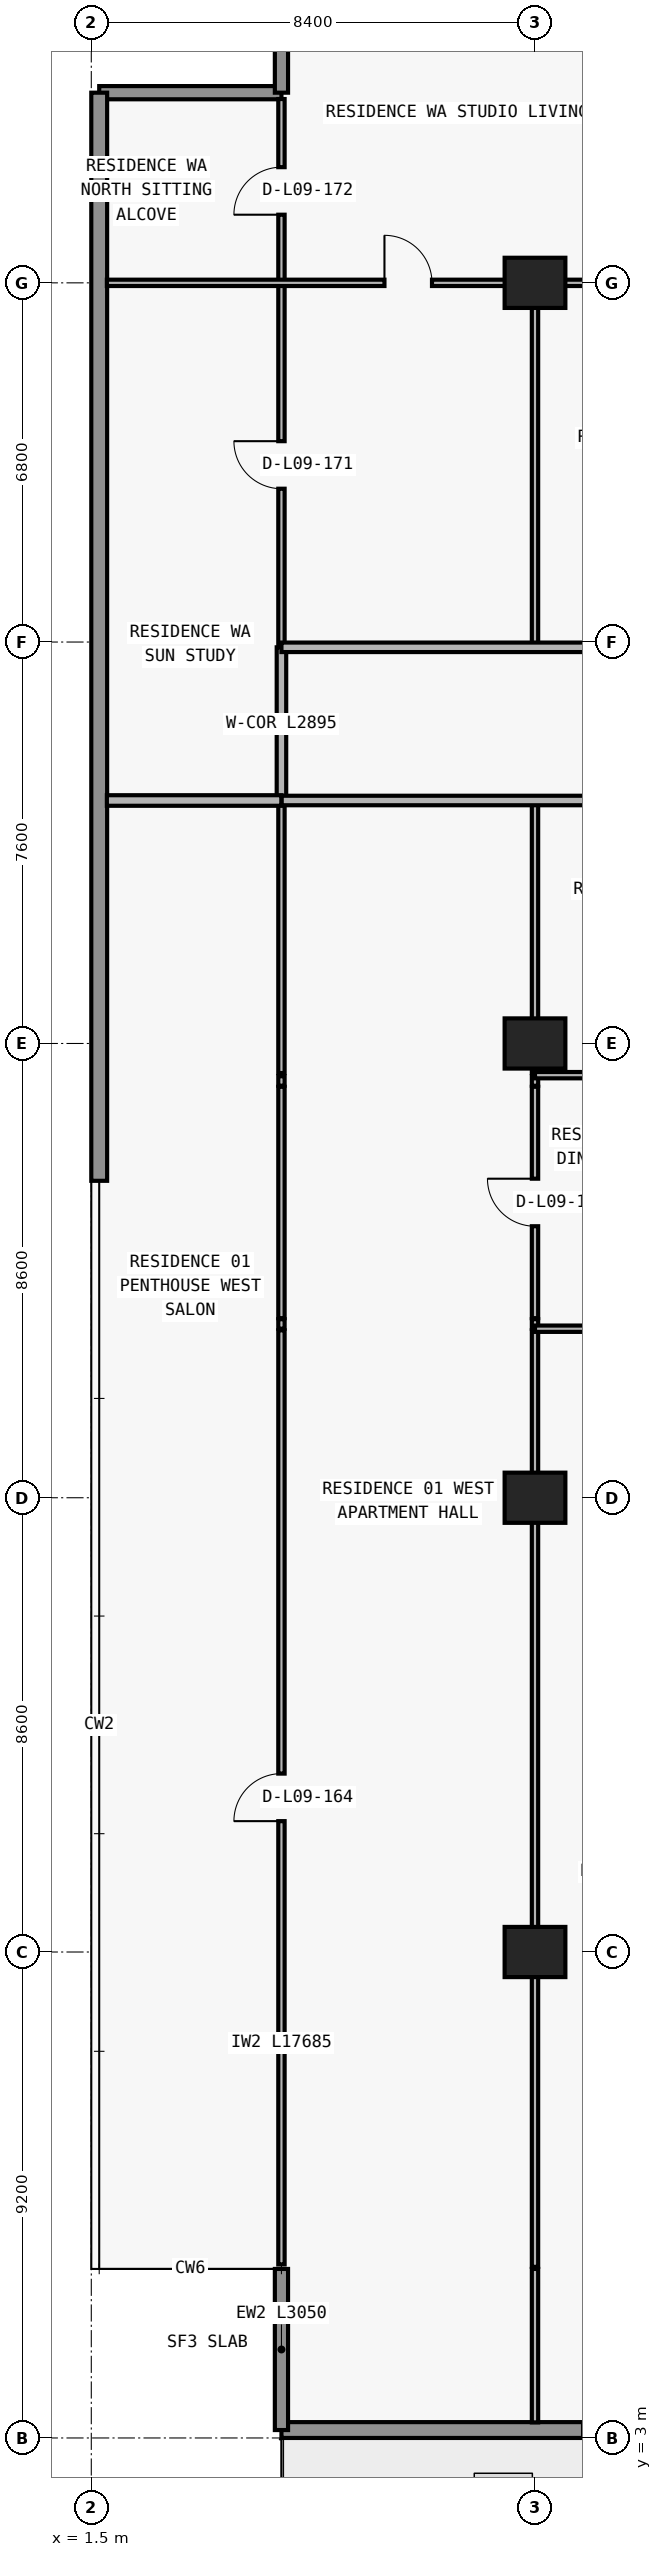
"""IFC4 building model, lengths in metres.
Left out: names, types, materials, properties, quantities, classifications, styles, units other than length and angle.
Written with IfcOpenShell. Run it as: python <this file> out.ifc"""

import sys

from ifc_helpers import new_model, si_unit, direction, frame, frame_2d, origin, origin_2d, place, context, subcontext, project, spatial, rectangle, extrude, element, fill, save


model = new_model("IFC4")
c1 = context("Model", 3, precision=1e-05, world=origin(), true_north=direction((0.0, 1.0)))
c2 = subcontext(c1, "Body", "Model", "MODEL_VIEW")
j1 = project(units=[si_unit("LENGTHUNIT", "METRE"), si_unit("PLANEANGLEUNIT", "RADIAN")], contexts=[c1])
p1 = place(None, origin())
s1 = spatial("IfcSite", under=j1, at=p1, CompositionType="ELEMENT")
p2 = place(p1, origin())
s2 = spatial("IfcBuilding", under=s1, at=p2, CompositionType="ELEMENT")
p3 = place(p2, frame((0.0, 0.0, 39.9)))
s3 = spatial("IfcBuildingStorey", under=s2, at=p3, CompositionType="ELEMENT", Elevation=39.9)
for number, where, z_axis, x_axis in (
    (1, (9.9, 12.2, 0.0), (0.0, 0.0, 1.0), (1.0, 0.0, 0.0)),
    (2, (9.9, 20.8, 0.0), (0.0, 0.0, 1.0), (1.0, 0.0, 0.0)),
    (3, (9.9, 29.4, 0.0), (0.0, 0.0, 1.0), (1.0, 0.0, 0.0)),
    (4, (9.9, 43.8, 0.0), (0.0, 0.0, 1.0), (1.0, 0.0, 0.0)),
):
    element("IfcColumn", number, at=place(p3, frame(where, z_axis=z_axis, x_axis=x_axis)), inside=s3, PredefinedType="COLUMN", context=c2, shape_type="SweptSolid", body=[
        extrude(rectangle(XDim=1.15, YDim=0.95, at=origin_2d()), origin(), (0.0, 0.0, 1.0), 3.05),
    ])
p4 = place(p3, frame((72.7, 3.15, 0.0), z_axis=(0.0, 0.0, 1.0), x_axis=(-1.0, 0.0, 0.0)))
e5 = element("IfcWall", 5, at=p4, inside=s3, PredefinedType="STANDARD", context=c2, shape_type="SweptSolid", body=[
    extrude(rectangle(XDim=67.6, YDim=0.3, at=frame_2d((33.8, 0.0))), origin(), (0.0, 0.0, 1.0), 3.05),
])
p5 = place(p4, frame((59.89, 0.0, 0.0)))
e6 = element("IfcOpeningElement", 6, at=p5, cuts=e5, PredefinedType="OPENING", context=c2, shape_type="SweptSolid", body=[
    extrude(rectangle(XDim=2.0, YDim=2.3, at=frame_2d((1.0, 1.15))), frame((0.0, 0.16, 0.0), z_axis=(0.0, -1.0, 0.0), x_axis=(1.0, 0.0, 0.0)), (0.0, 0.0, 1.0), 0.32),
])
p6 = place(p4, frame((55.21, 0.0, 0.65)))
e7 = element("IfcOpeningElement", 7, at=p6, cuts=e5, PredefinedType="OPENING", context=c2, shape_type="SweptSolid", body=[
    extrude(rectangle(XDim=2.6, YDim=1.85, at=frame_2d((1.3, 0.925))), frame((0.0, 0.16, 0.0), z_axis=(0.0, -1.0, 0.0), x_axis=(1.0, 0.0, 0.0)), (0.0, 0.0, 1.0), 0.32),
])
p7 = place(p4, frame((49.1, 0.0, 0.85)))
e8 = element("IfcOpeningElement", 8, at=p7, cuts=e5, PredefinedType="OPENING", context=c2, shape_type="SweptSolid", body=[
    extrude(rectangle(XDim=2.2, YDim=1.55, at=frame_2d((1.1, 0.775))), frame((0.0, 0.16, 0.0), z_axis=(0.0, -1.0, 0.0), x_axis=(1.0, 0.0, 0.0)), (0.0, 0.0, 1.0), 0.32),
])
p8 = place(p4, frame((42.69, 0.0, 0.0)))
e9 = element("IfcOpeningElement", 9, at=p8, cuts=e5, PredefinedType="OPENING", context=c2, shape_type="SweptSolid", body=[
    extrude(rectangle(XDim=2.0, YDim=2.3, at=frame_2d((1.0, 1.15))), frame((0.0, 0.16, 0.0), z_axis=(0.0, -1.0, 0.0), x_axis=(1.0, 0.0, 0.0)), (0.0, 0.0, 1.0), 0.32),
])
p9 = place(p4, frame((38.59, 0.0, 0.85)))
e10 = element("IfcOpeningElement", 10, at=p9, cuts=e5, PredefinedType="OPENING", context=c2, shape_type="SweptSolid", body=[
    extrude(rectangle(XDim=1.8, YDim=1.55, at=frame_2d((0.9, 0.775))), frame((0.0, 0.16, 0.0), z_axis=(0.0, -1.0, 0.0), x_axis=(1.0, 0.0, 0.0)), (0.0, 0.0, 1.0), 0.32),
])
p10 = place(p4, frame((30.914, 0.0, 0.85)))
e11 = element("IfcOpeningElement", 11, at=p10, cuts=e5, PredefinedType="OPENING", context=c2, shape_type="SweptSolid", body=[
    extrude(rectangle(XDim=2.2, YDim=1.55, at=frame_2d((1.1, 0.775))), frame((0.0, 0.16, 0.0), z_axis=(0.0, -1.0, 0.0), x_axis=(1.0, 0.0, 0.0)), (0.0, 0.0, 1.0), 0.32),
])
p11 = place(p4, frame((26.69, 0.0, 0.0)))
e12 = element("IfcOpeningElement", 12, at=p11, cuts=e5, PredefinedType="OPENING", context=c2, shape_type="SweptSolid", body=[
    extrude(rectangle(XDim=2.0, YDim=2.3, at=frame_2d((1.0, 1.15))), frame((0.0, 0.16, 0.0), z_axis=(0.0, -1.0, 0.0), x_axis=(1.0, 0.0, 0.0)), (0.0, 0.0, 1.0), 0.32),
])
p12 = place(p4, frame((22.59, 0.0, 0.85)))
e13 = element("IfcOpeningElement", 13, at=p12, cuts=e5, PredefinedType="OPENING", context=c2, shape_type="SweptSolid", body=[
    extrude(rectangle(XDim=1.8, YDim=1.55, at=frame_2d((0.9, 0.775))), frame((0.0, 0.16, 0.0), z_axis=(0.0, -1.0, 0.0), x_axis=(1.0, 0.0, 0.0)), (0.0, 0.0, 1.0), 0.32),
])
p13 = place(p4, frame((18.69, 0.0, 0.0)))
e14 = element("IfcOpeningElement", 14, at=p13, cuts=e5, PredefinedType="OPENING", context=c2, shape_type="SweptSolid", body=[
    extrude(rectangle(XDim=2.0, YDim=2.3, at=frame_2d((1.0, 1.15))), frame((0.0, 0.16, 0.0), z_axis=(0.0, -1.0, 0.0), x_axis=(1.0, 0.0, 0.0)), (0.0, 0.0, 1.0), 0.32),
])
p14 = place(p4, frame((14.01, 0.0, 0.65)))
e15 = element("IfcOpeningElement", 15, at=p14, cuts=e5, PredefinedType="OPENING", context=c2, shape_type="SweptSolid", body=[
    extrude(rectangle(XDim=2.6, YDim=1.85, at=frame_2d((1.3, 0.925))), frame((0.0, 0.16, 0.0), z_axis=(0.0, -1.0, 0.0), x_axis=(1.0, 0.0, 0.0)), (0.0, 0.0, 1.0), 0.32),
])
p15 = place(p4, frame((7.9, 0.0, 0.85)))
e16 = element("IfcOpeningElement", 16, at=p15, cuts=e5, PredefinedType="OPENING", context=c2, shape_type="SweptSolid", body=[
    extrude(rectangle(XDim=2.2, YDim=1.55, at=frame_2d((1.1, 0.775))), frame((0.0, 0.16, 0.0), z_axis=(0.0, -1.0, 0.0), x_axis=(1.0, 0.0, 0.0)), (0.0, 0.0, 1.0), 0.32),
])
p16 = place(p3, frame((5.1, 6.2, 0.0), z_axis=(0.0, 0.0, 1.0), x_axis=(0.0, -1.0, 0.0)))
e17 = element("IfcWall", 17, at=p16, inside=s3, PredefinedType="ELEMENTEDWALL", context=c2, shape_type="SweptSolid", body=[
    extrude(rectangle(XDim=3.05, YDim=0.25, at=frame_2d((1.525, 0.0))), origin(), (0.0, 0.0, 1.0), 3.05),
])
p17 = place(p3, frame((1.65, 47.4, 0.0), z_axis=(0.0, 0.0, 1.0), x_axis=(1.0, 0.0, 0.0)))
e18 = element("IfcWall", 18, at=p17, inside=s3, PredefinedType="ELEMENTEDWALL", context=c2, shape_type="SweptSolid", body=[
    extrude(rectangle(XDim=3.45, YDim=0.25, at=frame_2d((1.725, 0.0))), origin(), (0.0, 0.0, 1.0), 3.05),
])
p18 = place(p3, frame((5.1, 47.4, 0.0), z_axis=(0.0, 0.0, 1.0), x_axis=(0.0, 1.0, 0.0)))
e19 = element("IfcWall", 19, at=p18, inside=s3, PredefinedType="ELEMENTEDWALL", context=c2, shape_type="SweptSolid", body=[
    extrude(rectangle(XDim=3.05, YDim=0.25, at=frame_2d((1.525, 0.0))), origin(), (0.0, 0.0, 1.0), 3.05),
])
p19 = place(p3, frame((1.65, 26.8, 0.0), z_axis=(0.0, 0.0, 1.0), x_axis=(0.0, 1.0, 0.0)))
e20 = element("IfcWall", 20, at=p19, inside=s3, PredefinedType="STANDARD", context=c2, shape_type="SweptSolid", body=[
    extrude(rectangle(XDim=20.6, YDim=0.3, at=frame_2d((10.3, 0.0))), origin(), (0.0, 0.0, 1.0), 3.05),
])
p20 = place(p3, frame((5.1, 6.285, 0.0), z_axis=(0.0, 0.0, 1.0), x_axis=(0.0, 1.0, 0.0)))
e21 = element("IfcWall", 21, at=p20, inside=s3, PredefinedType="PARTITIONING", context=c2, shape_type="SweptSolid", body=[
    extrude(rectangle(XDim=17.685, YDim=0.12, at=frame_2d((8.843, 0.0))), origin(), (0.0, 0.0, 1.0), 3.05),
])
p21 = place(p20, frame((8.393, 0.0, 0.0)))
e22 = element("IfcOpeningElement", 22, at=p21, cuts=e21, PredefinedType="OPENING", context=c2, shape_type="SweptSolid", body=[
    extrude(rectangle(XDim=0.9, YDim=2.15, at=frame_2d((0.45, 1.075))), frame((0.0, 0.07, 0.0), z_axis=(0.0, -1.0, 0.0), x_axis=(1.0, 0.0, 0.0)), (0.0, 0.0, 1.0), 0.14),
])
p22 = place(p3, frame((5.1, 24.0, 0.0), z_axis=(0.0, 0.0, 1.0), x_axis=(0.0, 1.0, 0.0)))
e23 = element("IfcWall", 23, at=p22, inside=s3, PredefinedType="PARTITIONING", context=c2, shape_type="SweptSolid", body=[
    extrude(rectangle(XDim=0.18, YDim=0.12, at=frame_2d((0.09, 0.0))), origin(), (0.0, 0.0, 1.0), 3.05),
])
p23 = place(p3, frame((5.1, 24.2, 0.0), z_axis=(0.0, 0.0, 1.0), x_axis=(0.0, 1.0, 0.0)))
e24 = element("IfcWall", 24, at=p23, inside=s3, PredefinedType="PARTITIONING", context=c2, shape_type="SweptSolid", body=[
    extrude(rectangle(XDim=4.38, YDim=0.12, at=frame_2d((2.19, 0.0))), origin(), (0.0, 0.0, 1.0), 3.05),
])
p24 = place(p3, frame((5.1, 28.6, 0.0), z_axis=(0.0, 0.0, 1.0), x_axis=(0.0, 1.0, 0.0)))
e25 = element("IfcWall", 25, at=p24, inside=s3, PredefinedType="PARTITIONING", context=c2, shape_type="SweptSolid", body=[
    extrude(rectangle(XDim=0.18, YDim=0.12, at=frame_2d((0.09, 0.0))), origin(), (0.0, 0.0, 1.0), 3.05),
])
p25 = place(p3, frame((5.1, 28.84, 0.0), z_axis=(0.0, 0.0, 1.0), x_axis=(0.0, 1.0, 0.0)))
e26 = element("IfcWall", 26, at=p25, inside=s3, PredefinedType="PARTITIONING", context=c2, shape_type="SweptSolid", body=[
    extrude(rectangle(XDim=5.16, YDim=0.12, at=frame_2d((2.58, 0.0))), origin(), (0.0, 0.0, 1.0), 3.05),
])
p26 = place(p3, frame((5.1, 34.005, 0.0), z_axis=(0.0, 0.0, 1.0), x_axis=(0.0, 1.0, 0.0)))
e27 = element("IfcWall", 27, at=p26, inside=s3, PredefinedType="PARTITIONING", context=c2, shape_type="SweptSolid", body=[
    extrude(rectangle(XDim=2.895, YDim=0.18, at=frame_2d((1.448, 0.0))), origin(), (0.0, 0.0, 1.0), 3.05),
])
p27 = place(p3, frame((5.1, 36.905, 0.0), z_axis=(0.0, 0.0, 1.0), x_axis=(0.0, 1.0, 0.0)))
e28 = element("IfcWall", 28, at=p27, inside=s3, PredefinedType="PARTITIONING", context=c2, shape_type="SweptSolid", body=[
    extrude(rectangle(XDim=10.375, YDim=0.12, at=frame_2d((5.188, 0.0))), origin(), (0.0, 0.0, 1.0), 3.05),
])
p28 = place(p27, frame((2.998, 0.0, 0.0)))
e29 = element("IfcOpeningElement", 29, at=p28, cuts=e28, PredefinedType="OPENING", context=c2, shape_type="SweptSolid", body=[
    extrude(rectangle(XDim=0.9, YDim=2.15, at=frame_2d((0.45, 1.075))), frame((0.0, 0.07, 0.0), z_axis=(0.0, -1.0, 0.0), x_axis=(1.0, 0.0, 0.0)), (0.0, 0.0, 1.0), 0.14),
])
p29 = place(p27, frame((8.185, 0.0, 0.0)))
e30 = element("IfcOpeningElement", 30, at=p29, cuts=e28, PredefinedType="OPENING", context=c2, shape_type="SweptSolid", body=[
    extrude(rectangle(XDim=0.9, YDim=2.15, at=frame_2d((0.45, 1.075))), frame((0.0, 0.07, 0.0), z_axis=(0.0, -1.0, 0.0), x_axis=(1.0, 0.0, 0.0)), (0.0, 0.0, 1.0), 0.14),
])
p30 = place(p3, frame((9.9, 3.295, 0.0), z_axis=(0.0, 0.0, 1.0), x_axis=(0.0, 1.0, 0.0)))
e31 = element("IfcWall", 31, at=p30, inside=s3, PredefinedType="PARTITIONING", context=c2, shape_type="SweptSolid", body=[
    extrude(rectangle(XDim=2.905, YDim=0.12, at=frame_2d((1.453, 0.0))), origin(), (0.0, 0.0, 1.0), 3.05),
])
p31 = place(p3, frame((9.9, 6.24, 0.0), z_axis=(0.0, 0.0, 1.0), x_axis=(0.0, 1.0, 0.0)))
e32 = element("IfcWall", 32, at=p31, inside=s3, PredefinedType="PARTITIONING", context=c2, shape_type="SweptSolid", body=[
    extrude(rectangle(XDim=17.73, YDim=0.12, at=frame_2d((8.865, 0.0))), origin(), (0.0, 0.0, 1.0), 2.11),
])
p32 = place(p3, frame((9.9, 24.0, 0.0), z_axis=(0.0, 0.0, 1.0), x_axis=(0.0, 1.0, 0.0)))
e33 = element("IfcWall", 33, at=p32, inside=s3, PredefinedType="PARTITIONING", context=c2, shape_type="SweptSolid", body=[
    extrude(rectangle(XDim=0.18, YDim=0.12, at=frame_2d((0.09, 0.0))), origin(), (0.0, 0.0, 1.0), 2.11),
])
p33 = place(p3, frame((9.9, 24.2, 0.0), z_axis=(0.0, 0.0, 1.0), x_axis=(0.0, 1.0, 0.0)))
e34 = element("IfcWall", 34, at=p33, inside=s3, PredefinedType="PARTITIONING", context=c2, shape_type="SweptSolid", body=[
    extrude(rectangle(XDim=4.38, YDim=0.12, at=frame_2d((2.19, 0.0))), origin(), (0.0, 0.0, 1.0), 2.11),
])
p34 = place(p33, frame((1.74, 0.0, 0.0)))
e35 = element("IfcOpeningElement", 35, at=p34, cuts=e34, PredefinedType="OPENING", context=c2, shape_type="SweptSolid", body=[
    extrude(rectangle(XDim=0.9, YDim=2.06, at=frame_2d((0.45, 1.03))), frame((0.0, 0.07, 0.0), z_axis=(0.0, -1.0, 0.0), x_axis=(1.0, 0.0, 0.0)), (0.0, 0.0, 1.0), 0.14),
])
p35 = place(p3, frame((9.9, 28.6, 0.0), z_axis=(0.0, 0.0, 1.0), x_axis=(0.0, 1.0, 0.0)))
e36 = element("IfcWall", 36, at=p35, inside=s3, PredefinedType="PARTITIONING", context=c2, shape_type="SweptSolid", body=[
    extrude(rectangle(XDim=0.18, YDim=0.12, at=frame_2d((0.09, 0.0))), origin(), (0.0, 0.0, 1.0), 2.11),
])
p36 = place(p3, frame((9.9, 28.84, 0.0), z_axis=(0.0, 0.0, 1.0), x_axis=(0.0, 1.0, 0.0)))
e37 = element("IfcWall", 37, at=p36, inside=s3, PredefinedType="PARTITIONING", context=c2, shape_type="SweptSolid", body=[
    extrude(rectangle(XDim=5.16, YDim=0.12, at=frame_2d((2.58, 0.0))), origin(), (0.0, 0.0, 1.0), 2.11),
])
p37 = place(p3, frame((9.9, 36.9, 0.0), z_axis=(0.0, 0.0, 1.0), x_axis=(0.0, 1.0, 0.0)))
e38 = element("IfcWall", 38, at=p37, inside=s3, PredefinedType="PARTITIONING", context=c2, shape_type="SweptSolid", body=[
    extrude(rectangle(XDim=6.9, YDim=0.12, at=frame_2d((3.45, 0.0))), origin(), (0.0, 0.0, 1.0), 2.11),
])
p38 = place(p3, frame((9.9, 24.0, 0.0), z_axis=(0.0, 0.0, 1.0), x_axis=(1.0, 0.0, 0.0)))
e39 = element("IfcWall", 39, at=p38, inside=s3, PredefinedType="PARTITIONING", context=c2, shape_type="SweptSolid", body=[
    extrude(rectangle(XDim=8.4, YDim=0.12, at=frame_2d((4.2, 0.0))), origin(), (0.0, 0.0, 1.0), 3.05),
])
p39 = place(p38, frame((1.44, 0.0, 0.0)))
e40 = element("IfcOpeningElement", 40, at=p39, cuts=e39, PredefinedType="OPENING", context=c2, shape_type="SweptSolid", body=[
    extrude(rectangle(XDim=0.9, YDim=2.15, at=frame_2d((0.45, 1.075))), frame((0.0, 0.07, 0.0), z_axis=(0.0, -1.0, 0.0), x_axis=(1.0, 0.0, 0.0)), (0.0, 0.0, 1.0), 0.14),
])
p40 = place(p3, frame((9.9, 28.8, 0.0), z_axis=(0.0, 0.0, 1.0), x_axis=(1.0, 0.0, 0.0)))
e41 = element("IfcWall", 41, at=p40, inside=s3, PredefinedType="PARTITIONING", context=c2, shape_type="SweptSolid", body=[
    extrude(rectangle(XDim=8.395, YDim=0.12, at=frame_2d((4.198, 0.0))), origin(), (0.0, 0.0, 1.0), 3.05),
])
p41 = place(p40, frame((1.44, 0.0, 0.0)))
e42 = element("IfcOpeningElement", 42, at=p41, cuts=e41, PredefinedType="OPENING", context=c2, shape_type="SweptSolid", body=[
    extrude(rectangle(XDim=0.9, YDim=2.15, at=frame_2d((0.45, 1.075))), frame((0.0, 0.07, 0.0), z_axis=(0.0, -1.0, 0.0), x_axis=(1.0, 0.0, 0.0)), (0.0, 0.0, 1.0), 0.14),
])
p42 = place(p3, frame((1.795, 34.0, 0.0), z_axis=(0.0, 0.0, 1.0), x_axis=(1.0, 0.0, 0.0)))
e43 = element("IfcWall", 43, at=p42, inside=s3, PredefinedType="PARTITIONING", context=c2, shape_type="SweptSolid", body=[
    extrude(rectangle(XDim=3.305, YDim=0.2, at=frame_2d((1.653, 0.0))), origin(), (0.0, 0.0, 1.0), 3.05),
])
p43 = place(p3, frame((5.105, 34.0, 0.0), z_axis=(0.0, 0.0, 1.0), x_axis=(1.0, 0.0, 0.0)))
e44 = element("IfcWall", 44, at=p43, inside=s3, PredefinedType="PARTITIONING", context=c2, shape_type="SweptSolid", body=[
    extrude(rectangle(XDim=67.595, YDim=0.18, at=frame_2d((33.797, 0.0))), origin(), (0.0, 0.0, 1.0), 3.05),
])
p44 = place(p43, frame((7.504, 0.0, 0.0)))
e45 = element("IfcOpeningElement", 45, at=p44, cuts=e44, PredefinedType="OPENING", context=c2, shape_type="SweptSolid", body=[
    extrude(rectangle(XDim=1.0, YDim=2.2, at=frame_2d((0.5, 1.1))), frame((0.0, 0.1, 0.0), z_axis=(0.0, -1.0, 0.0), x_axis=(1.0, 0.0, 0.0)), (0.0, 0.0, 1.0), 0.2),
])
p45 = place(p43, frame((24.213, 0.0, 0.0)))
e46 = element("IfcOpeningElement", 46, at=p45, cuts=e44, PredefinedType="OPENING", context=c2, shape_type="SweptSolid", body=[
    extrude(rectangle(XDim=1.0, YDim=2.2, at=frame_2d((0.5, 1.1))), frame((0.0, 0.1, 0.0), z_axis=(0.0, -1.0, 0.0), x_axis=(1.0, 0.0, 0.0)), (0.0, 0.0, 1.0), 0.2),
])
p46 = place(p43, frame((32.365, 0.0, 0.0)))
e47 = element("IfcOpeningElement", 47, at=p46, cuts=e44, PredefinedType="OPENING", context=c2, shape_type="SweptSolid", body=[
    extrude(rectangle(XDim=1.0, YDim=2.2, at=frame_2d((0.5, 1.1))), frame((0.0, 0.1, 0.0), z_axis=(0.0, -1.0, 0.0), x_axis=(1.0, 0.0, 0.0)), (0.0, 0.0, 1.0), 0.2),
])
p47 = place(p43, frame((40.24, 0.0, 0.0)))
e48 = element("IfcOpeningElement", 48, at=p47, cuts=e44, PredefinedType="OPENING", context=c2, shape_type="SweptSolid", body=[
    extrude(rectangle(XDim=1.0, YDim=2.2, at=frame_2d((0.5, 1.1))), frame((0.0, 0.1, 0.0), z_axis=(0.0, -1.0, 0.0), x_axis=(1.0, 0.0, 0.0)), (0.0, 0.0, 1.0), 0.2),
])
p48 = place(p43, frame((48.708, 0.0, 0.0)))
e49 = element("IfcOpeningElement", 49, at=p48, cuts=e44, PredefinedType="OPENING", context=c2, shape_type="SweptSolid", body=[
    extrude(rectangle(XDim=1.0, YDim=2.2, at=frame_2d((0.5, 1.1))), frame((0.0, 0.1, 0.0), z_axis=(0.0, -1.0, 0.0), x_axis=(1.0, 0.0, 0.0)), (0.0, 0.0, 1.0), 0.2),
])
p49 = place(p3, frame((5.1, 36.9, 0.0), z_axis=(0.0, 0.0, 1.0), x_axis=(1.0, 0.0, 0.0)))
e50 = element("IfcWall", 50, at=p49, inside=s3, PredefinedType="PARTITIONING", context=c2, shape_type="SweptSolid", body=[
    extrude(rectangle(XDim=12.645, YDim=0.18, at=frame_2d((6.323, 0.0))), origin(), (0.0, 0.0, 1.0), 3.05),
])
p50 = place(p49, frame((7.125, 0.0, 0.0)))
e51 = element("IfcOpeningElement", 51, at=p50, cuts=e50, PredefinedType="OPENING", context=c2, shape_type="SweptSolid", body=[
    extrude(rectangle(XDim=1.0, YDim=2.2, at=frame_2d((0.5, 1.1))), frame((0.0, 0.1, 0.0), z_axis=(0.0, -1.0, 0.0), x_axis=(1.0, 0.0, 0.0)), (0.0, 0.0, 1.0), 0.2),
])
p51 = place(p3, frame((1.795, 43.8, 0.0), z_axis=(0.0, 0.0, 1.0), x_axis=(1.0, 0.0, 0.0)))
e52 = element("IfcWall", 52, at=p51, inside=s3, PredefinedType="PARTITIONING", context=c2, shape_type="SweptSolid", body=[
    extrude(rectangle(XDim=15.96, YDim=0.12, at=frame_2d((7.98, 0.0))), origin(), (0.0, 0.0, 1.0), 2.339),
])
p52 = place(p51, frame((5.255, 0.0, 0.0)))
e53 = element("IfcOpeningElement", 53, at=p52, cuts=e52, PredefinedType="OPENING", context=c2, shape_type="SweptSolid", body=[
    extrude(rectangle(XDim=0.9, YDim=2.15, at=frame_2d((0.45, 1.075))), frame((0.0, 0.07, 0.0), z_axis=(0.0, -1.0, 0.0), x_axis=(1.0, 0.0, 0.0)), (0.0, 0.0, 1.0), 0.14),
])
p53 = place(p51, frame((10.48, 0.0, 0.0)))
e54 = element("IfcOpeningElement", 54, at=p53, cuts=e52, PredefinedType="OPENING", context=c2, shape_type="SweptSolid", body=[
    extrude(rectangle(XDim=0.9, YDim=2.15, at=frame_2d((0.45, 1.075))), frame((0.0, 0.07, 0.0), z_axis=(0.0, -1.0, 0.0), x_axis=(1.0, 0.0, 0.0)), (0.0, 0.0, 1.0), 0.14),
])
p54 = place(p51, frame((14.433, 0.0, 0.0)))
e55 = element("IfcOpeningElement", 55, at=p54, cuts=e52, PredefinedType="OPENING", context=c2, shape_type="SweptSolid", body=[
    extrude(rectangle(XDim=0.85, YDim=2.1, at=frame_2d((0.425, 1.05))), frame((0.0, 0.07, 0.0), z_axis=(0.0, -1.0, 0.0), x_axis=(1.0, 0.0, 0.0)), (0.0, 0.0, 1.0), 0.14),
])
p55 = place(p34, origin())
e56 = element("IfcDoor", 56, at=p55, inside=s3, OperationType="SINGLE_SWING_RIGHT", PredefinedType="DOOR", context=c2, shape_type="SweptSolid", body=[
    extrude(rectangle(XDim=0.9, YDim=2.06, at=frame_2d((0.45, 1.03))), frame((0.0, 0.025, 0.0), z_axis=(0.0, -1.0, 0.0), x_axis=(1.0, 0.0, 0.0)), (0.0, 0.0, 1.0), 0.05),
])
fill(e35, e56)
p56 = place(p21, origin())
e57 = element("IfcDoor", 57, at=p56, inside=s3, OperationType="SINGLE_SWING_LEFT", PredefinedType="DOOR", context=c2, shape_type="SweptSolid", body=[
    extrude(rectangle(XDim=0.9, YDim=2.15, at=frame_2d((0.45, 1.075))), frame((0.0, 0.025, 0.0), z_axis=(0.0, -1.0, 0.0), x_axis=(1.0, 0.0, 0.0)), (0.0, 0.0, 1.0), 0.05),
])
fill(e22, e57)
p57 = place(p52, origin())
e58 = element("IfcDoor", 58, at=p57, inside=s3, OperationType="SINGLE_SWING_LEFT", PredefinedType="DOOR", context=c2, shape_type="SweptSolid", body=[
    extrude(rectangle(XDim=0.9, YDim=2.15, at=frame_2d((0.45, 1.075))), frame((0.0, 0.025, 0.0), z_axis=(0.0, -1.0, 0.0), x_axis=(1.0, 0.0, 0.0)), (0.0, 0.0, 1.0), 0.05),
])
fill(e53, e58)
p58 = place(p28, origin())
e59 = element("IfcDoor", 59, at=p58, inside=s3, OperationType="SINGLE_SWING_RIGHT", PredefinedType="DOOR", context=c2, shape_type="SweptSolid", body=[
    extrude(rectangle(XDim=0.9, YDim=2.15, at=frame_2d((0.45, 1.075))), frame((0.0, 0.025, 0.0), z_axis=(0.0, -1.0, 0.0), x_axis=(1.0, 0.0, 0.0)), (0.0, 0.0, 1.0), 0.05),
])
fill(e29, e59)
p59 = place(p29, origin())
e60 = element("IfcDoor", 60, at=p59, inside=s3, OperationType="SINGLE_SWING_LEFT", PredefinedType="DOOR", context=c2, shape_type="SweptSolid", body=[
    extrude(rectangle(XDim=0.9, YDim=2.15, at=frame_2d((0.45, 1.075))), frame((0.0, 0.025, 0.0), z_axis=(0.0, -1.0, 0.0), x_axis=(1.0, 0.0, 0.0)), (0.0, 0.0, 1.0), 0.05),
])
fill(e30, e60)
save(model, sys.argv[1])
